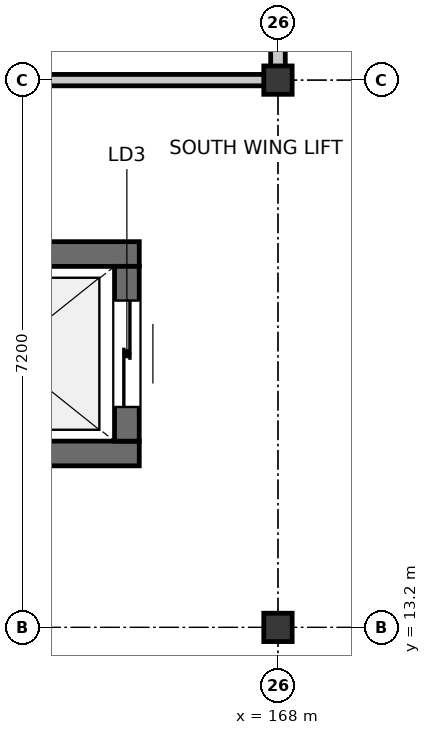
"""IFC4 building model, lengths in metres.
Left out: names, types, materials, properties, quantities, classifications, styles, units other than length and angle.
Written with IfcOpenShell. Run it as: python <this file> out.ifc"""

import sys

from ifc_helpers import new_model, si_unit, direction, frame, frame_2d, origin, origin_2d, place, context, subcontext, project, spatial, rectangle, i_section, extrude, element, fill, save


model = new_model("IFC4")
c1 = context("Model", 3, precision=1e-05, world=origin(), true_north=direction((0.0, 1.0)))
c2 = subcontext(c1, "Body", "Model", "MODEL_VIEW")
j1 = project(units=[si_unit("LENGTHUNIT", "METRE"), si_unit("PLANEANGLEUNIT", "RADIAN")], contexts=[c1])
p1 = place(None, origin())
s1 = spatial("IfcSite", under=j1, at=p1, CompositionType="ELEMENT")
p2 = place(p1, origin())
s2 = spatial("IfcBuilding", under=s1, at=p2, CompositionType="ELEMENT")
p3 = place(p2, frame((0.0, 0.0, 5.4)))
s3 = spatial("IfcBuildingStorey", under=s2, at=p3, CompositionType="ELEMENT", Elevation=5.4)
for number, where, z_axis, x_axis in (
    (1, (168.0, 13.2, 0.0), (0.0, 0.0, 1.0), (1.0, 0.0, 0.0)),
    (2, (168.0, 20.4, 0.0), (0.0, 0.0, 1.0), (1.0, 0.0, 0.0)),
):
    element("IfcColumn", number, at=place(p3, frame(where, z_axis=z_axis, x_axis=x_axis)), inside=s3, PredefinedType="COLUMN", context=c2, shape_type="SweptSolid", body=[
        extrude(i_section(OverallWidth=0.373, OverallDepth=0.373, WebThickness=0.016, FlangeThickness=0.026, FilletRadius=0.015, at=origin_2d()), origin(), (0.0, 0.0, 1.0), 3.9),
    ])
for number, where, z_axis, x_axis in (
    (3, (166.175, 15.488, 0.0), (0.0, 0.0, 1.0), (-1.0, 0.0, 0.0)),
    (4, (162.625, 18.112, 0.0), (0.0, 0.0, 1.0), (1.0, 0.0, 0.0)),
):
    element("IfcWall", number, at=place(p3, frame(where, z_axis=z_axis, x_axis=x_axis)), inside=s3, PredefinedType="SHEAR", context=c2, shape_type="SweptSolid", body=[
        extrude(rectangle(XDim=3.55, YDim=0.325, at=frame_2d((1.775, 0.0))), origin(), (0.0, 0.0, 1.0), 3.67),
    ])
p4 = place(p3, frame((166.012, 17.95, 0.0), z_axis=(0.0, 0.0, 1.0), x_axis=(0.0, -1.0, 0.0)))
e5 = element("IfcWall", 5, at=p4, inside=s3, PredefinedType="SHEAR", context=c2, shape_type="SweptSolid", body=[
    extrude(rectangle(XDim=2.3, YDim=0.325, at=frame_2d((1.15, 0.0))), origin(), (0.0, 0.0, 1.0), 3.67),
])
p5 = place(p4, frame((0.45, 0.0, 0.0)))
e6 = element("IfcOpeningElement", 6, at=p5, cuts=e5, PredefinedType="OPENING", context=c2, shape_type="SweptSolid", body=[
    extrude(rectangle(XDim=1.4, YDim=2.3, at=frame_2d((0.7, 1.15))), frame((0.0, 0.172, 0.0), z_axis=(0.0, -1.0, 0.0), x_axis=(1.0, 0.0, 0.0)), (0.0, 0.0, 1.0), 0.345),
])
p6 = place(p3, frame((168.08, 20.4, 0.0), z_axis=(0.0, 0.0, 1.0), x_axis=(-1.0, 0.0, 0.0)))
e7 = element("IfcWall", 7, at=p6, inside=s3, PredefinedType="PARTITIONING", context=c2, shape_type="SweptSolid", body=[
    extrude(rectangle(XDim=14.348, YDim=0.15, at=frame_2d((7.174, 0.0))), origin(), (0.0, 0.0, 1.0), 3.038),
])
p7 = place(p3, frame((168.0, 59.92, 0.0), z_axis=(0.0, 0.0, 1.0), x_axis=(0.0, -1.0, 0.0)))
e8 = element("IfcWall", 8, at=p7, inside=s3, PredefinedType="PARTITIONING", context=c2, shape_type="SweptSolid", body=[
    extrude(rectangle(XDim=39.443, YDim=0.192, at=frame_2d((19.721, 0.0))), origin(), (0.0, 0.0, 1.0), 3.038),
])
p8 = place(p7, frame((19.196, 0.0, 0.0)))
e9 = element("IfcOpeningElement", 9, at=p8, cuts=e8, PredefinedType="OPENING", context=c2, shape_type="SweptSolid", body=[
    extrude(rectangle(XDim=1.05, YDim=2.34, at=frame_2d((0.525, 1.17))), frame((0.0, 0.106, 0.0), z_axis=(0.0, -1.0, 0.0), x_axis=(1.0, 0.0, 0.0)), (0.0, 0.0, 1.0), 0.212),
])
p9 = place(p7, frame((21.496, 0.0, 0.95)))
e10 = element("IfcOpeningElement", 10, at=p9, cuts=e8, PredefinedType="OPENING", context=c2, shape_type="SweptSolid", body=[
    extrude(rectangle(XDim=2.25, YDim=1.45, at=frame_2d((1.125, 0.725))), frame((0.0, 0.106, 0.0), z_axis=(0.0, -1.0, 0.0), x_axis=(1.0, 0.0, 0.0)), (0.0, 0.0, 1.0), 0.212),
])
p10 = place(p5, origin())
e11 = element("IfcDoor", 11, at=p10, inside=s3, OperationType="DOUBLE_DOOR_SLIDING", PredefinedType="DOOR", context=c2, shape_type="SweptSolid", body=[
    extrude(rectangle(XDim=1.4, YDim=2.3, at=frame_2d((0.7, 1.15))), frame((0.0, 0.025, 0.0), z_axis=(0.0, -1.0, 0.0), x_axis=(1.0, 0.0, 0.0)), (0.0, 0.0, 1.0), 0.05),
])
fill(e6, e11)
save(model, sys.argv[1])
